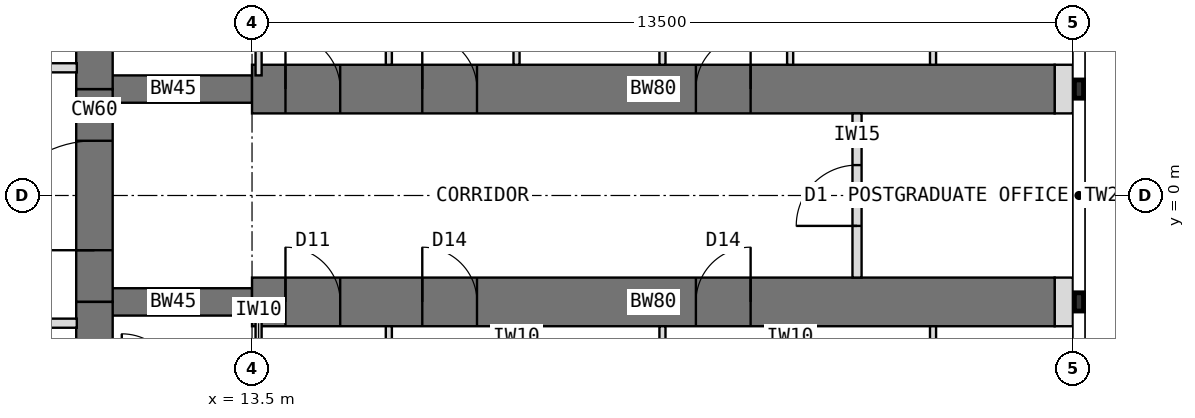
"""IFC4 building model, lengths in metres.
Left out: names, types, materials, properties, quantities, classifications, styles, units other than length and angle.
Written with IfcOpenShell. Run it as: python <this file> out.ifc"""

import sys

from ifc_helpers import new_model, si_unit, direction, frame, frame_2d, origin, place, context, subcontext, project, spatial, rectangle, extrude, element, fill, save


model = new_model("IFC4")
c1 = context("Model", 3, precision=1e-05, world=origin(), true_north=direction((0.0, 1.0)))
c2 = subcontext(c1, "Body", "Model", "MODEL_VIEW")
j1 = project(units=[si_unit("LENGTHUNIT", "METRE"), si_unit("PLANEANGLEUNIT", "RADIAN")], contexts=[c1])
p1 = place(None, origin())
s1 = spatial("IfcSite", under=j1, at=p1, CompositionType="ELEMENT")
p2 = place(p1, origin())
s2 = spatial("IfcBuilding", under=s1, at=p2, CompositionType="ELEMENT")
p3 = place(p2, frame((0.0, 0.0, 161.5)))
s3 = spatial("IfcBuildingStorey", under=s2, at=p3, CompositionType="ELEMENT", Elevation=161.5)
p4 = place(p3, frame((10.908, -6.298, 0.0), z_axis=(0.0, 0.0, 1.0), x_axis=(0.0, 1.0, 0.0)))
e1 = element("IfcWall", 1, at=p4, inside=s3, PredefinedType="SHEAR", context=c2, shape_type="SweptSolid", body=[
    extrude(rectangle(XDim=4.548, YDim=0.6, at=frame_2d((2.274, 0.0))), origin(), (0.0, 0.0, 1.0), 4.0),
])
p5 = place(p3, frame((10.908, -1.75, 0.0), z_axis=(0.0, 0.0, 1.0), x_axis=(0.0, 1.0, 0.0)))
e2 = element("IfcWall", 2, at=p5, inside=s3, PredefinedType="SHEAR", context=c2, shape_type="SweptSolid", body=[
    extrude(rectangle(XDim=3.5, YDim=0.6, at=frame_2d((1.75, 0.0))), origin(), (0.0, 0.0, 1.0), 4.0),
])
p6 = place(p5, frame((0.85, 0.0, 0.0)))
e3 = element("IfcOpeningElement", 3, at=p6, cuts=e2, PredefinedType="OPENING", context=c2, shape_type="SweptSolid", body=[
    extrude(rectangle(XDim=1.8, YDim=2.1, at=frame_2d((0.9, 1.05))), frame((0.0, 0.31, 0.0), z_axis=(0.0, -1.0, 0.0), x_axis=(1.0, 0.0, 0.0)), (0.0, 0.0, 1.0), 0.62),
])
p7 = place(p3, frame((10.908, 1.75, 0.0), z_axis=(0.0, 0.0, 1.0), x_axis=(0.0, 1.0, 0.0)))
e4 = element("IfcWall", 4, at=p7, inside=s3, PredefinedType="SHEAR", context=c2, shape_type="SweptSolid", body=[
    extrude(rectangle(XDim=4.548, YDim=0.6, at=frame_2d((2.274, 0.0))), origin(), (0.0, 0.0, 1.0), 4.0),
])
p8 = place(p3, frame((10.908, 1.75, 0.0), z_axis=(0.0, 0.0, 1.0), x_axis=(1.0, 0.0, 0.0)))
e5 = element("IfcWall", 5, at=p8, inside=s3, PredefinedType="SHEAR", context=c2, shape_type="SweptSolid", body=[
    extrude(rectangle(XDim=2.592, YDim=0.45, at=frame_2d((1.296, 0.0))), origin(), (0.0, 0.0, 1.0), 4.0),
])
p9 = place(p3, frame((13.5, 1.75, 0.0), z_axis=(0.0, 0.0, 1.0), x_axis=(1.0, 0.0, 0.0)))
e6 = element("IfcWall", 6, at=p9, inside=s3, PredefinedType="SHEAR", context=c2, shape_type="SweptSolid", body=[
    extrude(rectangle(XDim=13.2, YDim=0.8, at=frame_2d((6.6, 0.0))), origin(), (0.0, 0.0, 1.0), 4.0),
])
p10 = place(p9, frame((0.55, 0.0, 0.0)))
e7 = element("IfcOpeningElement", 7, at=p10, cuts=e6, PredefinedType="OPENING", context=c2, shape_type="SweptSolid", body=[
    extrude(rectangle(XDim=0.9, YDim=2.1, at=frame_2d((0.45, 1.05))), frame((0.0, 0.41, 0.0), z_axis=(0.0, -1.0, 0.0), x_axis=(1.0, 0.0, 0.0)), (0.0, 0.0, 1.0), 0.82),
])
p11 = place(p9, frame((2.8, 0.0, 0.0)))
e8 = element("IfcOpeningElement", 8, at=p11, cuts=e6, PredefinedType="OPENING", context=c2, shape_type="SweptSolid", body=[
    extrude(rectangle(XDim=0.9, YDim=2.1, at=frame_2d((0.45, 1.05))), frame((0.0, 0.41, 0.0), z_axis=(0.0, -1.0, 0.0), x_axis=(1.0, 0.0, 0.0)), (0.0, 0.0, 1.0), 0.82),
])
p12 = place(p9, frame((7.3, 0.0, 0.0)))
e9 = element("IfcOpeningElement", 9, at=p12, cuts=e6, PredefinedType="OPENING", context=c2, shape_type="SweptSolid", body=[
    extrude(rectangle(XDim=0.9, YDim=2.1, at=frame_2d((0.45, 1.05))), frame((0.0, 0.41, 0.0), z_axis=(0.0, -1.0, 0.0), x_axis=(1.0, 0.0, 0.0)), (0.0, 0.0, 1.0), 0.82),
])
p13 = place(p3, frame((10.908, -1.75, 0.0), z_axis=(0.0, 0.0, 1.0), x_axis=(1.0, 0.0, 0.0)))
e10 = element("IfcWall", 10, at=p13, inside=s3, PredefinedType="SHEAR", context=c2, shape_type="SweptSolid", body=[
    extrude(rectangle(XDim=2.592, YDim=0.45, at=frame_2d((1.296, 0.0))), origin(), (0.0, 0.0, 1.0), 4.0),
])
p14 = place(p3, frame((13.5, -1.75, 0.0), z_axis=(0.0, 0.0, 1.0), x_axis=(1.0, 0.0, 0.0)))
e11 = element("IfcWall", 11, at=p14, inside=s3, PredefinedType="SHEAR", context=c2, shape_type="SweptSolid", body=[
    extrude(rectangle(XDim=13.2, YDim=0.8, at=frame_2d((6.6, 0.0))), origin(), (0.0, 0.0, 1.0), 4.0),
])
p15 = place(p14, frame((0.55, 0.0, 0.0)))
e12 = element("IfcOpeningElement", 12, at=p15, cuts=e11, PredefinedType="OPENING", context=c2, shape_type="SweptSolid", body=[
    extrude(rectangle(XDim=0.9, YDim=2.1, at=frame_2d((0.45, 1.05))), frame((0.0, 0.41, 0.0), z_axis=(0.0, -1.0, 0.0), x_axis=(1.0, 0.0, 0.0)), (0.0, 0.0, 1.0), 0.82),
])
p16 = place(p14, frame((2.8, 0.0, 0.0)))
e13 = element("IfcOpeningElement", 13, at=p16, cuts=e11, PredefinedType="OPENING", context=c2, shape_type="SweptSolid", body=[
    extrude(rectangle(XDim=0.9, YDim=2.1, at=frame_2d((0.45, 1.05))), frame((0.0, 0.41, 0.0), z_axis=(0.0, -1.0, 0.0), x_axis=(1.0, 0.0, 0.0)), (0.0, 0.0, 1.0), 0.82),
])
p17 = place(p14, frame((7.3, 0.0, 0.0)))
e14 = element("IfcOpeningElement", 14, at=p17, cuts=e11, PredefinedType="OPENING", context=c2, shape_type="SweptSolid", body=[
    extrude(rectangle(XDim=0.9, YDim=2.1, at=frame_2d((0.45, 1.05))), frame((0.0, 0.41, 0.0), z_axis=(0.0, -1.0, 0.0), x_axis=(1.0, 0.0, 0.0)), (0.0, 0.0, 1.0), 0.82),
])
for number, where, z_axis, x_axis in (
    (15, (26.7, 1.75, 0.0), (0.0, 0.0, 1.0), (1.0, 0.0, 0.0)),
    (16, (26.7, -1.75, 0.0), (0.0, 0.0, 1.0), (1.0, 0.0, 0.0)),
):
    element("IfcWall", number, at=place(p3, frame(where, z_axis=z_axis, x_axis=x_axis)), inside=s3, PredefinedType="PARTITIONING", context=c2, shape_type="SweptSolid", body=[
        extrude(rectangle(XDim=0.3, YDim=0.8, at=frame_2d((0.15, 0.0))), origin(), (0.0, 0.0, 1.0), 3.7),
    ])
for number, where, z_axis, x_axis in (
    (17, (15.75, 2.15, 0.0), (0.0, 0.0, 1.0), (0.0, 1.0, 0.0)),
    (18, (20.25, 2.15, 0.0), (0.0, 0.0, 1.0), (0.0, 1.0, 0.0)),
):
    element("IfcWall", number, at=place(p3, frame(where, z_axis=z_axis, x_axis=x_axis)), inside=s3, PredefinedType="PARTITIONING", context=c2, shape_type="SweptSolid", body=[
        extrude(rectangle(XDim=4.6, YDim=0.1, at=frame_2d((2.3, 0.0))), origin(), (0.0, 0.0, 1.0), 3.7),
    ])
p18 = place(p3, frame((17.85, 2.15, 0.0), z_axis=(0.0, 0.0, 1.0), x_axis=(0.0, 1.0, 0.0)))
e19 = element("IfcWall", 19, at=p18, inside=s3, PredefinedType="PARTITIONING", context=c2, shape_type="SweptSolid", body=[
    extrude(rectangle(XDim=3.4, YDim=0.1, at=frame_2d((1.7, 0.0))), origin(), (0.0, 0.0, 1.0), 3.7),
])
p19 = place(p18, frame((1.25, 0.0, 0.0)))
e20 = element("IfcOpeningElement", 20, at=p19, cuts=e19, PredefinedType="OPENING", context=c2, shape_type="SweptSolid", body=[
    extrude(rectangle(XDim=0.9, YDim=2.1, at=frame_2d((0.45, 1.05))), frame((0.0, 0.06, 0.0), z_axis=(0.0, -1.0, 0.0), x_axis=(1.0, 0.0, 0.0)), (0.0, 0.0, 1.0), 0.12),
])
p20 = place(p3, frame((22.35, 2.15, 0.0), z_axis=(0.0, 0.0, 1.0), x_axis=(0.0, 1.0, 0.0)))
e21 = element("IfcWall", 21, at=p20, inside=s3, PredefinedType="PARTITIONING", context=c2, shape_type="SweptSolid", body=[
    extrude(rectangle(XDim=3.4, YDim=0.1, at=frame_2d((1.7, 0.0))), origin(), (0.0, 0.0, 1.0), 3.7),
])
p21 = place(p20, frame((1.25, 0.0, 0.0)))
e22 = element("IfcOpeningElement", 22, at=p21, cuts=e21, PredefinedType="OPENING", context=c2, shape_type="SweptSolid", body=[
    extrude(rectangle(XDim=0.9, YDim=2.1, at=frame_2d((0.45, 1.05))), frame((0.0, 0.06, 0.0), z_axis=(0.0, -1.0, 0.0), x_axis=(1.0, 0.0, 0.0)), (0.0, 0.0, 1.0), 0.12),
])
p22 = place(p3, frame((24.7, 2.15, 0.0), z_axis=(0.0, 0.0, 1.0), x_axis=(0.0, 1.0, 0.0)))
e23 = element("IfcWall", 23, at=p22, inside=s3, PredefinedType="PARTITIONING", context=c2, shape_type="SweptSolid", body=[
    extrude(rectangle(XDim=3.4, YDim=0.1, at=frame_2d((1.7, 0.0))), origin(), (0.0, 0.0, 1.0), 3.7),
])
p23 = place(p3, frame((13.608, 1.975, 0.0), z_axis=(0.0, 0.0, 1.0), x_axis=(0.0, 1.0, 0.0)))
e24 = element("IfcWall", 24, at=p23, inside=s3, PredefinedType="PARTITIONING", context=c2, shape_type="SweptSolid", body=[
    extrude(rectangle(XDim=3.2, YDim=0.1, at=frame_2d((1.6, 0.0))), origin(), (0.0, 0.0, 1.0), 3.7),
])
for number, where, z_axis, x_axis in (
    (25, (15.75, -2.15, 0.0), (0.0, 0.0, 1.0), (0.0, -1.0, 0.0)),
    (26, (20.25, -2.15, 0.0), (0.0, 0.0, 1.0), (0.0, -1.0, 0.0)),
):
    element("IfcWall", number, at=place(p3, frame(where, z_axis=z_axis, x_axis=x_axis)), inside=s3, PredefinedType="PARTITIONING", context=c2, shape_type="SweptSolid", body=[
        extrude(rectangle(XDim=4.6, YDim=0.1, at=frame_2d((2.3, 0.0))), origin(), (0.0, 0.0, 1.0), 3.7),
    ])
p24 = place(p3, frame((17.85, -2.15, 0.0), z_axis=(0.0, 0.0, 1.0), x_axis=(0.0, -1.0, 0.0)))
e27 = element("IfcWall", 27, at=p24, inside=s3, PredefinedType="PARTITIONING", context=c2, shape_type="SweptSolid", body=[
    extrude(rectangle(XDim=3.4, YDim=0.1, at=frame_2d((1.7, 0.0))), origin(), (0.0, 0.0, 1.0), 3.7),
])
p25 = place(p24, frame((1.25, 0.0, 0.0)))
e28 = element("IfcOpeningElement", 28, at=p25, cuts=e27, PredefinedType="OPENING", context=c2, shape_type="SweptSolid", body=[
    extrude(rectangle(XDim=0.9, YDim=2.1, at=frame_2d((0.45, 1.05))), frame((0.0, 0.06, 0.0), z_axis=(0.0, -1.0, 0.0), x_axis=(1.0, 0.0, 0.0)), (0.0, 0.0, 1.0), 0.12),
])
p26 = place(p3, frame((22.35, -2.15, 0.0), z_axis=(0.0, 0.0, 1.0), x_axis=(0.0, -1.0, 0.0)))
e29 = element("IfcWall", 29, at=p26, inside=s3, PredefinedType="PARTITIONING", context=c2, shape_type="SweptSolid", body=[
    extrude(rectangle(XDim=3.4, YDim=0.1, at=frame_2d((1.7, 0.0))), origin(), (0.0, 0.0, 1.0), 3.7),
])
p27 = place(p26, frame((1.25, 0.0, 0.0)))
e30 = element("IfcOpeningElement", 30, at=p27, cuts=e29, PredefinedType="OPENING", context=c2, shape_type="SweptSolid", body=[
    extrude(rectangle(XDim=0.9, YDim=2.1, at=frame_2d((0.45, 1.05))), frame((0.0, 0.06, 0.0), z_axis=(0.0, -1.0, 0.0), x_axis=(1.0, 0.0, 0.0)), (0.0, 0.0, 1.0), 0.12),
])
p28 = place(p3, frame((24.7, -2.15, 0.0), z_axis=(0.0, 0.0, 1.0), x_axis=(0.0, -1.0, 0.0)))
e31 = element("IfcWall", 31, at=p28, inside=s3, PredefinedType="PARTITIONING", context=c2, shape_type="SweptSolid", body=[
    extrude(rectangle(XDim=3.4, YDim=0.1, at=frame_2d((1.7, 0.0))), origin(), (0.0, 0.0, 1.0), 3.7),
])
p29 = place(p3, frame((13.608, -1.975, 0.0), z_axis=(0.0, 0.0, 1.0), x_axis=(0.0, -1.0, 0.0)))
e32 = element("IfcWall", 32, at=p29, inside=s3, PredefinedType="PARTITIONING", context=c2, shape_type="SweptSolid", body=[
    extrude(rectangle(XDim=1.2, YDim=0.1, at=frame_2d((0.6, 0.0))), origin(), (0.0, 0.0, 1.0), 3.7),
])
p30 = place(p3, frame((6.143, 2.1, 0.0), z_axis=(0.0, 0.0, 1.0), x_axis=(1.0, 0.0, 0.0)))
e33 = element("IfcWall", 33, at=p30, inside=s3, PredefinedType="PARTITIONING", context=c2, shape_type="SweptSolid", body=[
    extrude(rectangle(XDim=4.476, YDim=0.15, at=frame_2d((2.238, 0.0))), origin(), (0.0, 0.0, 1.0), 3.7),
])
p31 = place(p30, frame((2.633, 0.0, 0.0)))
e34 = element("IfcOpeningElement", 34, at=p31, cuts=e33, PredefinedType="OPENING", context=c2, shape_type="SweptSolid", body=[
    extrude(rectangle(XDim=1.0, YDim=2.1, at=frame_2d((0.5, 1.05))), frame((0.0, 0.085, 0.0), z_axis=(0.0, -1.0, 0.0), x_axis=(1.0, 0.0, 0.0)), (0.0, 0.0, 1.0), 0.17),
])
p32 = place(p3, frame((10.618, -2.1, 0.0), z_axis=(0.0, 0.0, 1.0), x_axis=(-1.0, 0.0, 0.0)))
e35 = element("IfcWall", 35, at=p32, inside=s3, PredefinedType="PARTITIONING", context=c2, shape_type="SweptSolid", body=[
    extrude(rectangle(XDim=4.476, YDim=0.15, at=frame_2d((2.238, 0.0))), origin(), (0.0, 0.0, 1.0), 3.7),
])
p33 = place(p32, frame((0.843, 0.0, 0.0)))
e36 = element("IfcOpeningElement", 36, at=p33, cuts=e35, PredefinedType="OPENING", context=c2, shape_type="SweptSolid", body=[
    extrude(rectangle(XDim=1.0, YDim=2.1, at=frame_2d((0.5, 1.05))), frame((0.0, 0.085, 0.0), z_axis=(0.0, -1.0, 0.0), x_axis=(1.0, 0.0, 0.0)), (0.0, 0.0, 1.0), 0.17),
])
p34 = place(p3, frame((23.45, -1.35, 0.0), z_axis=(0.0, 0.0, 1.0), x_axis=(0.0, 1.0, 0.0)))
e37 = element("IfcWall", 37, at=p34, inside=s3, PredefinedType="PARTITIONING", context=c2, shape_type="SweptSolid", body=[
    extrude(rectangle(XDim=2.7, YDim=0.15, at=frame_2d((1.35, 0.0))), origin(), (0.0, 0.0, 1.0), 3.7),
])
p35 = place(p34, frame((0.85, 0.0, 0.0)))
e38 = element("IfcOpeningElement", 38, at=p35, cuts=e37, PredefinedType="OPENING", context=c2, shape_type="SweptSolid", body=[
    extrude(rectangle(XDim=1.0, YDim=2.1, at=frame_2d((0.5, 1.05))), frame((0.0, 0.085, 0.0), z_axis=(0.0, -1.0, 0.0), x_axis=(1.0, 0.0, 0.0)), (0.0, 0.0, 1.0), 0.17),
])
p36 = place(p6, origin())
e39 = element("IfcDoor", 39, at=p36, inside=s3, OperationType="DOUBLE_DOOR_DOUBLE_SWING", PredefinedType="DOOR", context=c2, shape_type="SweptSolid", body=[
    extrude(rectangle(XDim=1.72, YDim=2.06, at=frame_2d((0.9, 1.03))), frame((0.0, 0.025, 0.0), z_axis=(0.0, -1.0, 0.0), x_axis=(1.0, 0.0, 0.0)), (0.0, 0.0, 1.0), 0.05),
    extrude(rectangle(XDim=0.04, YDim=2.1, at=frame_2d((0.02, 1.05))), frame((0.0, 0.3, 0.0), z_axis=(0.0, -1.0, 0.0), x_axis=(1.0, 0.0, 0.0)), (0.0, 0.0, 1.0), 0.6),
    extrude(rectangle(XDim=0.04, YDim=2.1, at=frame_2d((1.78, 1.05))), frame((0.0, 0.3, 0.0), z_axis=(0.0, -1.0, 0.0), x_axis=(1.0, 0.0, 0.0)), (0.0, 0.0, 1.0), 0.6),
    extrude(rectangle(XDim=1.72, YDim=0.04, at=frame_2d((0.9, 2.08))), frame((0.0, 0.3, 0.0), z_axis=(0.0, -1.0, 0.0), x_axis=(1.0, 0.0, 0.0)), (0.0, 0.0, 1.0), 0.6),
])
fill(e3, e39)
p37 = place(p35, origin())
e40 = element("IfcDoor", 40, at=p37, inside=s3, OperationType="SINGLE_SWING_LEFT", PredefinedType="DOOR", context=c2, shape_type="SweptSolid", body=[
    extrude(rectangle(XDim=1.0, YDim=2.1, at=frame_2d((0.5, 1.05))), frame((0.0, 0.025, 0.0), z_axis=(0.0, -1.0, 0.0), x_axis=(1.0, 0.0, 0.0)), (0.0, 0.0, 1.0), 0.05),
])
fill(e38, e40)
p38 = place(p10, origin())
e41 = element("IfcDoor", 41, at=p38, inside=s3, OperationType="SINGLE_SWING_LEFT", PredefinedType="DOOR", context=c2, shape_type="SweptSolid", body=[
    extrude(rectangle(XDim=0.82, YDim=2.06, at=frame_2d((0.45, 1.03))), frame((0.0, 0.025, 0.0), z_axis=(0.0, -1.0, 0.0), x_axis=(1.0, 0.0, 0.0)), (0.0, 0.0, 1.0), 0.05),
    extrude(rectangle(XDim=0.04, YDim=2.1, at=frame_2d((0.02, 1.05))), frame((0.0, 0.4, 0.0), z_axis=(0.0, -1.0, 0.0), x_axis=(1.0, 0.0, 0.0)), (0.0, 0.0, 1.0), 0.8),
    extrude(rectangle(XDim=0.04, YDim=2.1, at=frame_2d((0.88, 1.05))), frame((0.0, 0.4, 0.0), z_axis=(0.0, -1.0, 0.0), x_axis=(1.0, 0.0, 0.0)), (0.0, 0.0, 1.0), 0.8),
    extrude(rectangle(XDim=0.82, YDim=0.04, at=frame_2d((0.45, 2.08))), frame((0.0, 0.4, 0.0), z_axis=(0.0, -1.0, 0.0), x_axis=(1.0, 0.0, 0.0)), (0.0, 0.0, 1.0), 0.8),
])
fill(e7, e41)
p39 = place(p11, origin())
e42 = element("IfcDoor", 42, at=p39, inside=s3, OperationType="SINGLE_SWING_LEFT", PredefinedType="DOOR", context=c2, shape_type="SweptSolid", body=[
    extrude(rectangle(XDim=0.82, YDim=2.06, at=frame_2d((0.45, 1.03))), frame((0.0, 0.025, 0.0), z_axis=(0.0, -1.0, 0.0), x_axis=(1.0, 0.0, 0.0)), (0.0, 0.0, 1.0), 0.05),
    extrude(rectangle(XDim=0.04, YDim=2.1, at=frame_2d((0.02, 1.05))), frame((0.0, 0.4, 0.0), z_axis=(0.0, -1.0, 0.0), x_axis=(1.0, 0.0, 0.0)), (0.0, 0.0, 1.0), 0.8),
    extrude(rectangle(XDim=0.04, YDim=2.1, at=frame_2d((0.88, 1.05))), frame((0.0, 0.4, 0.0), z_axis=(0.0, -1.0, 0.0), x_axis=(1.0, 0.0, 0.0)), (0.0, 0.0, 1.0), 0.8),
    extrude(rectangle(XDim=0.82, YDim=0.04, at=frame_2d((0.45, 2.08))), frame((0.0, 0.4, 0.0), z_axis=(0.0, -1.0, 0.0), x_axis=(1.0, 0.0, 0.0)), (0.0, 0.0, 1.0), 0.8),
])
fill(e8, e42)
p40 = place(p12, origin())
e43 = element("IfcDoor", 43, at=p40, inside=s3, OperationType="SINGLE_SWING_RIGHT", PredefinedType="DOOR", context=c2, shape_type="SweptSolid", body=[
    extrude(rectangle(XDim=0.82, YDim=2.06, at=frame_2d((0.45, 1.03))), frame((0.0, 0.025, 0.0), z_axis=(0.0, -1.0, 0.0), x_axis=(1.0, 0.0, 0.0)), (0.0, 0.0, 1.0), 0.05),
    extrude(rectangle(XDim=0.04, YDim=2.1, at=frame_2d((0.02, 1.05))), frame((0.0, 0.4, 0.0), z_axis=(0.0, -1.0, 0.0), x_axis=(1.0, 0.0, 0.0)), (0.0, 0.0, 1.0), 0.8),
    extrude(rectangle(XDim=0.04, YDim=2.1, at=frame_2d((0.88, 1.05))), frame((0.0, 0.4, 0.0), z_axis=(0.0, -1.0, 0.0), x_axis=(1.0, 0.0, 0.0)), (0.0, 0.0, 1.0), 0.8),
    extrude(rectangle(XDim=0.82, YDim=0.04, at=frame_2d((0.45, 2.08))), frame((0.0, 0.4, 0.0), z_axis=(0.0, -1.0, 0.0), x_axis=(1.0, 0.0, 0.0)), (0.0, 0.0, 1.0), 0.8),
])
fill(e9, e43)
p41 = place(p15, origin())
e44 = element("IfcDoor", 44, at=p41, inside=s3, OperationType="SINGLE_SWING_LEFT", PredefinedType="DOOR", context=c2, shape_type="SweptSolid", body=[
    extrude(rectangle(XDim=0.82, YDim=2.06, at=frame_2d((0.45, 1.03))), frame((0.0, 0.025, 0.0), z_axis=(0.0, -1.0, 0.0), x_axis=(1.0, 0.0, 0.0)), (0.0, 0.0, 1.0), 0.05),
    extrude(rectangle(XDim=0.04, YDim=2.1, at=frame_2d((0.02, 1.05))), frame((0.0, 0.4, 0.0), z_axis=(0.0, -1.0, 0.0), x_axis=(1.0, 0.0, 0.0)), (0.0, 0.0, 1.0), 0.8),
    extrude(rectangle(XDim=0.04, YDim=2.1, at=frame_2d((0.88, 1.05))), frame((0.0, 0.4, 0.0), z_axis=(0.0, -1.0, 0.0), x_axis=(1.0, 0.0, 0.0)), (0.0, 0.0, 1.0), 0.8),
    extrude(rectangle(XDim=0.82, YDim=0.04, at=frame_2d((0.45, 2.08))), frame((0.0, 0.4, 0.0), z_axis=(0.0, -1.0, 0.0), x_axis=(1.0, 0.0, 0.0)), (0.0, 0.0, 1.0), 0.8),
])
fill(e12, e44)
p42 = place(p16, origin())
e45 = element("IfcDoor", 45, at=p42, inside=s3, OperationType="SINGLE_SWING_LEFT", PredefinedType="DOOR", context=c2, shape_type="SweptSolid", body=[
    extrude(rectangle(XDim=0.82, YDim=2.06, at=frame_2d((0.45, 1.03))), frame((0.0, 0.025, 0.0), z_axis=(0.0, -1.0, 0.0), x_axis=(1.0, 0.0, 0.0)), (0.0, 0.0, 1.0), 0.05),
    extrude(rectangle(XDim=0.04, YDim=2.1, at=frame_2d((0.02, 1.05))), frame((0.0, 0.4, 0.0), z_axis=(0.0, -1.0, 0.0), x_axis=(1.0, 0.0, 0.0)), (0.0, 0.0, 1.0), 0.8),
    extrude(rectangle(XDim=0.04, YDim=2.1, at=frame_2d((0.88, 1.05))), frame((0.0, 0.4, 0.0), z_axis=(0.0, -1.0, 0.0), x_axis=(1.0, 0.0, 0.0)), (0.0, 0.0, 1.0), 0.8),
    extrude(rectangle(XDim=0.82, YDim=0.04, at=frame_2d((0.45, 2.08))), frame((0.0, 0.4, 0.0), z_axis=(0.0, -1.0, 0.0), x_axis=(1.0, 0.0, 0.0)), (0.0, 0.0, 1.0), 0.8),
])
fill(e13, e45)
p43 = place(p17, origin())
e46 = element("IfcDoor", 46, at=p43, inside=s3, OperationType="SINGLE_SWING_RIGHT", PredefinedType="DOOR", context=c2, shape_type="SweptSolid", body=[
    extrude(rectangle(XDim=0.82, YDim=2.06, at=frame_2d((0.45, 1.03))), frame((0.0, 0.025, 0.0), z_axis=(0.0, -1.0, 0.0), x_axis=(1.0, 0.0, 0.0)), (0.0, 0.0, 1.0), 0.05),
    extrude(rectangle(XDim=0.04, YDim=2.1, at=frame_2d((0.02, 1.05))), frame((0.0, 0.4, 0.0), z_axis=(0.0, -1.0, 0.0), x_axis=(1.0, 0.0, 0.0)), (0.0, 0.0, 1.0), 0.8),
    extrude(rectangle(XDim=0.04, YDim=2.1, at=frame_2d((0.88, 1.05))), frame((0.0, 0.4, 0.0), z_axis=(0.0, -1.0, 0.0), x_axis=(1.0, 0.0, 0.0)), (0.0, 0.0, 1.0), 0.8),
    extrude(rectangle(XDim=0.82, YDim=0.04, at=frame_2d((0.45, 2.08))), frame((0.0, 0.4, 0.0), z_axis=(0.0, -1.0, 0.0), x_axis=(1.0, 0.0, 0.0)), (0.0, 0.0, 1.0), 0.8),
])
fill(e14, e46)
save(model, sys.argv[1])
